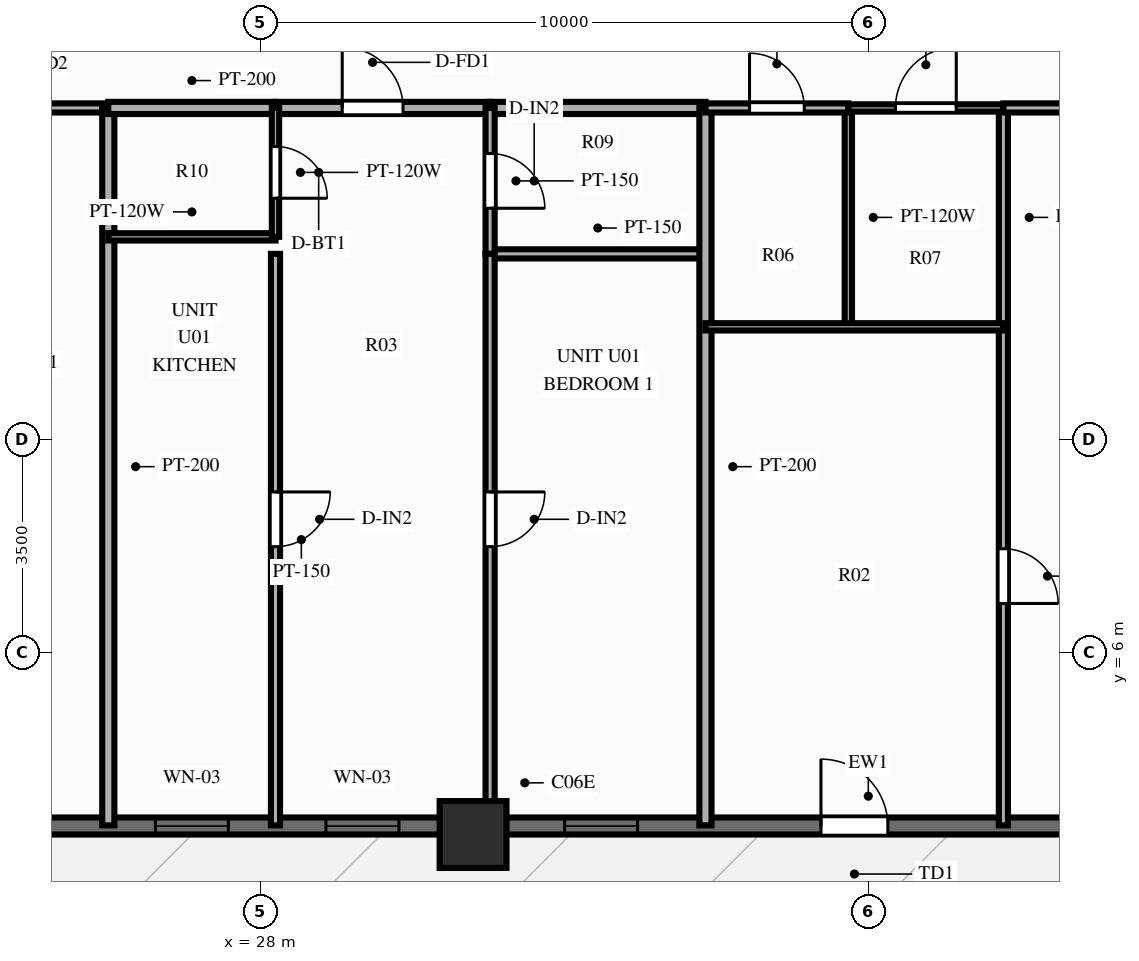
"""IFC4 building model, lengths in metres.
Left out: names, types, materials, properties, quantities, classifications, styles, units other than length and angle.
Written with IfcOpenShell. Run it as: python <this file> out.ifc"""

import sys

from ifc_helpers import new_model, si_unit, direction, frame, frame_2d, origin, origin_2d, place, context, subcontext, project, spatial, rectangle, extrude, source, transform, mapped, element, fill, save


model = new_model("IFC4")
c1 = context("Model", 3, precision=1e-05, world=origin(), true_north=direction((0.0, 1.0)))
c2 = subcontext(c1, "Body", "Model", "MODEL_VIEW")
j1 = project(units=[si_unit("LENGTHUNIT", "METRE"), si_unit("PLANEANGLEUNIT", "RADIAN")], contexts=[c1])
p1 = place(None, origin())
s1 = spatial("IfcSite", under=j1, at=p1, CompositionType="ELEMENT")
p2 = place(p1, origin())
s2 = spatial("IfcBuilding", under=s1, at=p2, CompositionType="ELEMENT")
p3 = place(p2, frame((0.0, 0.0, 46.4)))
s3 = spatial("IfcBuildingStorey", under=s2, at=p3, CompositionType="ELEMENT", Elevation=46.4)
m1 = source(origin(), c2, "Body", "SweptSolid", [
    extrude(rectangle(XDim=1.1, YDim=1.1, at=origin_2d()), origin(), (0.0, 0.0, 1.0), 3.0),
])
p4 = place(p3, frame((31.5, 3.0, 0.0), z_axis=(0.0, 0.0, 1.0), x_axis=(1.0, 0.0, 0.0)))
e1 = element("IfcColumn", 1, at=p4, inside=s3, PredefinedType="COLUMN", context=c2, shape_type="MappedRepresentation", body=[
    mapped(m1, transform((0.0, 0.0, 0.0), scale=1.0)),
])
p5 = place(p3, frame((15.5, 3.14, 0.0), z_axis=(0.0, 0.0, 1.0), x_axis=(1.0, 0.0, 0.0)))
e2 = element("IfcWall", 2, at=p5, inside=s3, PredefinedType="SOLIDWALL", context=c2, shape_type="SweptSolid", body=[
    extrude(rectangle(XDim=45.0, YDim=0.28, at=frame_2d((22.5, 0.0))), origin(), (0.0, 0.0, 1.0), 2.28),
])
p6 = place(p5, frame((2.135, 0.0, 0.25)))
e3 = element("IfcOpeningElement", 3, at=p6, cuts=e2, PredefinedType="OPENING", context=c2, shape_type="SweptSolid", body=[
    extrude(rectangle(XDim=1.2, YDim=1.5, at=frame_2d((0.6, 0.75))), frame((0.0, 0.152, 0.0), z_axis=(0.0, -1.0, 0.0), x_axis=(1.0, 0.0, 0.0)), (0.0, 0.0, 1.0), 0.304),
])
p7 = place(p5, frame((6.94, 0.0, 0.25)))
e4 = element("IfcOpeningElement", 4, at=p7, cuts=e2, PredefinedType="OPENING", context=c2, shape_type="SweptSolid", body=[
    extrude(rectangle(XDim=1.2, YDim=1.5, at=frame_2d((0.6, 0.75))), frame((0.0, 0.152, 0.0), z_axis=(0.0, -1.0, 0.0), x_axis=(1.0, 0.0, 0.0)), (0.0, 0.0, 1.0), 0.304),
])
p8 = place(p5, frame((10.776, 0.0, 0.25)))
e5 = element("IfcOpeningElement", 5, at=p8, cuts=e2, PredefinedType="OPENING", context=c2, shape_type="SweptSolid", body=[
    extrude(rectangle(XDim=1.2, YDim=1.5, at=frame_2d((0.6, 0.75))), frame((0.0, 0.152, 0.0), z_axis=(0.0, -1.0, 0.0), x_axis=(1.0, 0.0, 0.0)), (0.0, 0.0, 1.0), 0.304),
])
p9 = place(p5, frame((13.58, 0.0, 0.25)))
e6 = element("IfcOpeningElement", 6, at=p9, cuts=e2, PredefinedType="OPENING", context=c2, shape_type="SweptSolid", body=[
    extrude(rectangle(XDim=1.2, YDim=1.5, at=frame_2d((0.6, 0.75))), frame((0.0, 0.152, 0.0), z_axis=(0.0, -1.0, 0.0), x_axis=(1.0, 0.0, 0.0)), (0.0, 0.0, 1.0), 0.304),
])
p10 = place(p5, frame((17.506, 0.0, 0.25)))
e7 = element("IfcOpeningElement", 7, at=p10, cuts=e2, PredefinedType="OPENING", context=c2, shape_type="SweptSolid", body=[
    extrude(rectangle(XDim=1.2, YDim=1.5, at=frame_2d((0.6, 0.75))), frame((0.0, 0.152, 0.0), z_axis=(0.0, -1.0, 0.0), x_axis=(1.0, 0.0, 0.0)), (0.0, 0.0, 1.0), 0.304),
])
p11 = place(p5, frame((22.822, 0.0, 0.0), z_axis=(0.0, 0.0, 1.0), x_axis=(-1.0, 0.0, 0.0)))
e8 = element("IfcOpeningElement", 8, at=p11, cuts=e2, PredefinedType="OPENING", context=c2, shape_type="SweptSolid", body=[
    extrude(rectangle(XDim=1.1, YDim=2.15, at=frame_2d((0.55, 1.075))), frame((0.0, 0.152, 0.0), z_axis=(0.0, -1.0, 0.0), x_axis=(1.0, 0.0, 0.0)), (0.0, 0.0, 1.0), 0.304),
])
p12 = place(p5, frame((26.066, 0.0, 0.25)))
e9 = element("IfcOpeningElement", 9, at=p12, cuts=e2, PredefinedType="OPENING", context=c2, shape_type="SweptSolid", body=[
    extrude(rectangle(XDim=1.2, YDim=1.5, at=frame_2d((0.6, 0.75))), frame((0.0, 0.152, 0.0), z_axis=(0.0, -1.0, 0.0), x_axis=(1.0, 0.0, 0.0)), (0.0, 0.0, 1.0), 0.304),
])
p13 = place(p5, frame((30.255, 0.0, 0.25)))
e10 = element("IfcOpeningElement", 10, at=p13, cuts=e2, PredefinedType="OPENING", context=c2, shape_type="SweptSolid", body=[
    extrude(rectangle(XDim=1.2, YDim=1.5, at=frame_2d((0.6, 0.75))), frame((0.0, 0.152, 0.0), z_axis=(0.0, -1.0, 0.0), x_axis=(1.0, 0.0, 0.0)), (0.0, 0.0, 1.0), 0.304),
])
p14 = place(p5, frame((33.346, 0.0, 0.25)))
e11 = element("IfcOpeningElement", 11, at=p14, cuts=e2, PredefinedType="OPENING", context=c2, shape_type="SweptSolid", body=[
    extrude(rectangle(XDim=1.2, YDim=1.5, at=frame_2d((0.6, 0.75))), frame((0.0, 0.152, 0.0), z_axis=(0.0, -1.0, 0.0), x_axis=(1.0, 0.0, 0.0)), (0.0, 0.0, 1.0), 0.304),
])
p15 = place(p5, frame((37.821, 0.0, 0.25)))
e12 = element("IfcOpeningElement", 12, at=p15, cuts=e2, PredefinedType="OPENING", context=c2, shape_type="SweptSolid", body=[
    extrude(rectangle(XDim=1.2, YDim=1.5, at=frame_2d((0.6, 0.75))), frame((0.0, 0.152, 0.0), z_axis=(0.0, -1.0, 0.0), x_axis=(1.0, 0.0, 0.0)), (0.0, 0.0, 1.0), 0.304),
])
p16 = place(p5, frame((42.341, 0.0, 0.25)))
e13 = element("IfcOpeningElement", 13, at=p16, cuts=e2, PredefinedType="OPENING", context=c2, shape_type="SweptSolid", body=[
    extrude(rectangle(XDim=1.2, YDim=1.5, at=frame_2d((0.6, 0.75))), frame((0.0, 0.152, 0.0), z_axis=(0.0, -1.0, 0.0), x_axis=(1.0, 0.0, 0.0)), (0.0, 0.0, 1.0), 0.304),
])
p17 = place(p3, frame((20.58, 14.95, 0.0), z_axis=(0.0, 0.0, 1.0), x_axis=(1.0, 0.0, 0.0)))
e14 = element("IfcWall", 14, at=p17, inside=s3, PredefinedType="PARTITIONING", context=c2, shape_type="SweptSolid", body=[
    extrude(rectangle(XDim=4.921, YDim=0.15, at=frame_2d((2.46, 0.0))), origin(), (0.0, 0.0, 1.0), 2.79),
])
p18 = place(p17, frame((1.773, 0.0, 0.0)))
e15 = element("IfcOpeningElement", 15, at=p18, cuts=e14, PredefinedType="OPENING", context=c2, shape_type="SweptSolid", body=[
    extrude(rectangle(XDim=1.1, YDim=2.15, at=frame_2d((0.55, 1.075))), frame((0.0, 0.087, 0.0), z_axis=(0.0, -1.0, 0.0), x_axis=(1.0, 0.0, 0.0)), (0.0, 0.0, 1.0), 0.174),
])
p19 = place(p3, frame((25.501, 14.95, 0.0), z_axis=(0.0, 0.0, 1.0), x_axis=(0.0, -1.0, 0.0)))
e16 = element("IfcWall", 16, at=p19, inside=s3, PredefinedType="PARTITIONING", context=c2, shape_type="SweptSolid", body=[
    extrude(rectangle(XDim=11.8, YDim=0.2, at=frame_2d((5.9, 0.0))), origin(), (0.0, 0.0, 1.0), 2.79),
])
p20 = place(p3, frame((25.501, 14.95, 0.0), z_axis=(0.0, 0.0, 1.0), x_axis=(1.0, 0.0, 0.0)))
e17 = element("IfcWall", 17, at=p20, inside=s3, PredefinedType="PARTITIONING", context=c2, shape_type="SweptSolid", body=[
    extrude(rectangle(XDim=2.75, YDim=0.2, at=frame_2d((1.375, 0.0))), origin(), (0.0, 0.0, 1.0), 2.79),
])
p21 = place(p3, frame((28.25, 14.95, 0.0), z_axis=(0.0, 0.0, 1.0), x_axis=(1.0, 0.0, 0.0)))
e18 = element("IfcWall", 18, at=p21, inside=s3, PredefinedType="PARTITIONING", context=c2, shape_type="SweptSolid", body=[
    extrude(rectangle(XDim=3.53, YDim=0.2, at=frame_2d((1.765, 0.0))), origin(), (0.0, 0.0, 1.0), 2.79),
])
p22 = place(p21, frame((1.097, 0.0, 0.0)))
e19 = element("IfcOpeningElement", 19, at=p22, cuts=e18, PredefinedType="OPENING", context=c2, shape_type="SweptSolid", body=[
    extrude(rectangle(XDim=1.0, YDim=2.15, at=frame_2d((0.5, 1.075))), frame((0.0, 0.112, 0.0), z_axis=(0.0, -1.0, 0.0), x_axis=(1.0, 0.0, 0.0)), (0.0, 0.0, 1.0), 0.224),
])
p23 = place(p3, frame((31.78, 14.95, 0.0), z_axis=(0.0, 0.0, 1.0), x_axis=(1.0, 0.0, 0.0)))
e20 = element("IfcWall", 20, at=p23, inside=s3, PredefinedType="PARTITIONING", context=c2, shape_type="SweptSolid", body=[
    extrude(rectangle(XDim=3.542, YDim=0.2, at=frame_2d((1.771, 0.0))), origin(), (0.0, 0.0, 1.0), 2.79),
])
p24 = place(p3, frame((25.501, 12.83, 0.0), z_axis=(0.0, 0.0, 1.0), x_axis=(1.0, 0.0, 0.0)))
e21 = element("IfcWall", 21, at=p24, inside=s3, PredefinedType="PARTITIONING", context=c2, shape_type="SweptSolid", body=[
    extrude(rectangle(XDim=2.75, YDim=0.12, at=frame_2d((1.375, 0.0))), origin(), (0.0, 0.0, 1.0), 2.79),
])
p25 = place(p3, frame((31.78, 12.55, 0.0), z_axis=(0.0, 0.0, 1.0), x_axis=(1.0, 0.0, 0.0)))
e22 = element("IfcWall", 22, at=p25, inside=s3, PredefinedType="PARTITIONING", context=c2, shape_type="SweptSolid", body=[
    extrude(rectangle(XDim=3.542, YDim=0.15, at=frame_2d((1.771, 0.0))), origin(), (0.0, 0.0, 1.0), 2.79),
])
p26 = place(p3, frame((28.25, 14.95, 0.0), z_axis=(0.0, 0.0, 1.0), x_axis=(0.0, -1.0, 0.0)))
e23 = element("IfcWall", 23, at=p26, inside=s3, PredefinedType="PARTITIONING", context=c2, shape_type="SweptSolid", body=[
    extrude(rectangle(XDim=2.12, YDim=0.12, at=frame_2d((1.06, 0.0))), origin(), (0.0, 0.0, 1.0), 2.79),
])
p27 = place(p26, frame((0.635, 0.0, 0.0)))
e24 = element("IfcOpeningElement", 24, at=p27, cuts=e23, PredefinedType="OPENING", context=c2, shape_type="SweptSolid", body=[
    extrude(rectangle(XDim=0.85, YDim=2.05, at=frame_2d((0.425, 1.025))), frame((0.0, 0.072, 0.0), z_axis=(0.0, -1.0, 0.0), x_axis=(1.0, 0.0, 0.0)), (0.0, 0.0, 1.0), 0.144),
])
p28 = place(p3, frame((28.25, 12.55, 0.0), z_axis=(0.0, 0.0, 1.0), x_axis=(0.0, -1.0, 0.0)))
e25 = element("IfcWall", 25, at=p28, inside=s3, PredefinedType="PARTITIONING", context=c2, shape_type="SweptSolid", body=[
    extrude(rectangle(XDim=9.4, YDim=0.15, at=frame_2d((4.7, 0.0))), origin(), (0.0, 0.0, 1.0), 2.79),
])
p29 = place(p28, frame((3.916, 0.0, 0.0)))
e26 = element("IfcOpeningElement", 26, at=p29, cuts=e25, PredefinedType="OPENING", context=c2, shape_type="SweptSolid", body=[
    extrude(rectangle(XDim=0.9, YDim=2.1, at=frame_2d((0.45, 1.05))), frame((0.0, 0.087, 0.0), z_axis=(0.0, -1.0, 0.0), x_axis=(1.0, 0.0, 0.0)), (0.0, 0.0, 1.0), 0.174),
])
p30 = place(p3, frame((31.78, 14.95, 0.0), z_axis=(0.0, 0.0, 1.0), x_axis=(0.0, -1.0, 0.0)))
e27 = element("IfcWall", 27, at=p30, inside=s3, PredefinedType="PARTITIONING", context=c2, shape_type="SweptSolid", body=[
    extrude(rectangle(XDim=2.4, YDim=0.15, at=frame_2d((1.2, 0.0))), origin(), (0.0, 0.0, 1.0), 2.79),
])
p31 = place(p30, frame((0.75, 0.0, 0.0)))
e28 = element("IfcOpeningElement", 28, at=p31, cuts=e27, PredefinedType="OPENING", context=c2, shape_type="SweptSolid", body=[
    extrude(rectangle(XDim=0.9, YDim=2.1, at=frame_2d((0.45, 1.05))), frame((0.0, 0.087, 0.0), z_axis=(0.0, -1.0, 0.0), x_axis=(1.0, 0.0, 0.0)), (0.0, 0.0, 1.0), 0.174),
])
p32 = place(p3, frame((31.78, 12.55, 0.0), z_axis=(0.0, 0.0, 1.0), x_axis=(0.0, -1.0, 0.0)))
e29 = element("IfcWall", 29, at=p32, inside=s3, PredefinedType="PARTITIONING", context=c2, shape_type="SweptSolid", body=[
    extrude(rectangle(XDim=9.4, YDim=0.15, at=frame_2d((4.7, 0.0))), origin(), (0.0, 0.0, 1.0), 2.79),
])
p33 = place(p32, frame((3.916, 0.0, 0.0)))
e30 = element("IfcOpeningElement", 30, at=p33, cuts=e29, PredefinedType="OPENING", context=c2, shape_type="SweptSolid", body=[
    extrude(rectangle(XDim=0.9, YDim=2.1, at=frame_2d((0.45, 1.05))), frame((0.0, 0.087, 0.0), z_axis=(0.0, -1.0, 0.0), x_axis=(1.0, 0.0, 0.0)), (0.0, 0.0, 1.0), 0.174),
])
p34 = place(p3, frame((35.322, 14.95, 0.0), z_axis=(0.0, 0.0, 1.0), x_axis=(0.0, -1.0, 0.0)))
e31 = element("IfcWall", 31, at=p34, inside=s3, PredefinedType="PARTITIONING", context=c2, shape_type="SweptSolid", body=[
    extrude(rectangle(XDim=11.8, YDim=0.2, at=frame_2d((5.9, 0.0))), origin(), (0.0, 0.0, 1.0), 2.79),
])
p35 = place(p3, frame((37.672, 14.95, 0.0), z_axis=(0.0, 0.0, 1.0), x_axis=(0.0, -1.0, 0.0)))
e32 = element("IfcWall", 32, at=p35, inside=s3, PredefinedType="PARTITIONING", context=c2, shape_type="SweptSolid", body=[
    extrude(rectangle(XDim=3.6, YDim=0.12, at=frame_2d((1.8, 0.0))), origin(), (0.0, 0.0, 1.0), 2.79),
])
p36 = place(p3, frame((40.222, 14.95, 0.0), z_axis=(0.0, 0.0, 1.0), x_axis=(0.0, -1.0, 0.0)))
e33 = element("IfcWall", 33, at=p36, inside=s3, PredefinedType="PARTITIONING", context=c2, shape_type="SweptSolid", body=[
    extrude(rectangle(XDim=3.6, YDim=0.15, at=frame_2d((1.8, 0.0))), origin(), (0.0, 0.0, 1.0), 2.79),
])
p37 = place(p3, frame((40.222, 11.35, 0.0), z_axis=(0.0, 0.0, 1.0), x_axis=(0.0, -1.0, 0.0)))
e34 = element("IfcWall", 34, at=p37, inside=s3, PredefinedType="PARTITIONING", context=c2, shape_type="SweptSolid", body=[
    extrude(rectangle(XDim=8.2, YDim=0.15, at=frame_2d((4.1, 0.0))), origin(), (0.0, 0.0, 1.0), 2.79),
])
p38 = place(p37, frame((3.65, 0.0, 0.0)))
e35 = element("IfcOpeningElement", 35, at=p38, cuts=e34, PredefinedType="OPENING", context=c2, shape_type="SweptSolid", body=[
    extrude(rectangle(XDim=0.9, YDim=2.1, at=frame_2d((0.45, 1.05))), frame((0.0, 0.087, 0.0), z_axis=(0.0, -1.0, 0.0), x_axis=(1.0, 0.0, 0.0)), (0.0, 0.0, 1.0), 0.174),
])
p39 = place(p3, frame((35.322, 11.35, 0.0), z_axis=(0.0, 0.0, 1.0), x_axis=(1.0, 0.0, 0.0)))
e36 = element("IfcWall", 36, at=p39, inside=s3, PredefinedType="PARTITIONING", context=c2, shape_type="SweptSolid", body=[
    extrude(rectangle(XDim=4.9, YDim=0.12, at=frame_2d((2.45, 0.0))), origin(), (0.0, 0.0, 1.0), 2.79),
])
p40 = place(p3, frame((35.322, 14.95, 0.0), z_axis=(0.0, 0.0, 1.0), x_axis=(1.0, 0.0, 0.0)))
e37 = element("IfcWall", 37, at=p40, inside=s3, PredefinedType="PARTITIONING", context=c2, shape_type="SweptSolid", body=[
    extrude(rectangle(XDim=2.35, YDim=0.15, at=frame_2d((1.175, 0.0))), origin(), (0.0, 0.0, 1.0), 2.79),
])
p41 = place(p40, frame((0.725, 0.0, 0.0)))
e38 = element("IfcOpeningElement", 38, at=p41, cuts=e37, PredefinedType="OPENING", context=c2, shape_type="SweptSolid", body=[
    extrude(rectangle(XDim=0.9, YDim=2.1, at=frame_2d((0.45, 1.05))), frame((0.0, 0.087, 0.0), z_axis=(0.0, -1.0, 0.0), x_axis=(1.0, 0.0, 0.0)), (0.0, 0.0, 1.0), 0.174),
])
p42 = place(p3, frame((37.672, 14.95, 0.0), z_axis=(0.0, 0.0, 1.0), x_axis=(1.0, 0.0, 0.0)))
e39 = element("IfcWall", 39, at=p42, inside=s3, PredefinedType="PARTITIONING", context=c2, shape_type="SweptSolid", body=[
    extrude(rectangle(XDim=2.55, YDim=0.12, at=frame_2d((1.275, 0.0))), origin(), (0.0, 0.0, 1.0), 2.79),
])
p43 = place(p42, frame((0.775, 0.0, 0.0)))
e40 = element("IfcOpeningElement", 40, at=p43, cuts=e39, PredefinedType="OPENING", context=c2, shape_type="SweptSolid", body=[
    extrude(rectangle(XDim=1.0, YDim=2.1, at=frame_2d((0.5, 1.05))), frame((0.0, 0.072, 0.0), z_axis=(0.0, -1.0, 0.0), x_axis=(1.0, 0.0, 0.0)), (0.0, 0.0, 1.0), 0.144),
])
p44 = place(p3, frame((40.222, 14.95, 0.0), z_axis=(0.0, 0.0, 1.0), x_axis=(1.0, 0.0, 0.0)))
e41 = element("IfcWall", 41, at=p44, inside=s3, PredefinedType="PARTITIONING", context=c2, shape_type="SweptSolid", body=[
    extrude(rectangle(XDim=7.599, YDim=0.15, at=frame_2d((3.8, 0.0))), origin(), (0.0, 0.0, 1.0), 2.79),
])
p45 = place(p44, frame((3.0, 0.0, 0.0)))
e42 = element("IfcOpeningElement", 42, at=p45, cuts=e41, PredefinedType="OPENING", context=c2, shape_type="SweptSolid", body=[
    extrude(rectangle(XDim=1.1, YDim=2.15, at=frame_2d((0.55, 1.075))), frame((0.0, 0.087, 0.0), z_axis=(0.0, -1.0, 0.0), x_axis=(1.0, 0.0, 0.0)), (0.0, 0.0, 1.0), 0.174),
])
m2 = source(origin(), c2, "Body", "SweptSolid", [
    extrude(rectangle(XDim=1.2, YDim=1.5, at=frame_2d((0.6, 0.75))), frame((0.0, 0.03, 0.0), z_axis=(0.0, -1.0, 0.0), x_axis=(1.0, 0.0, 0.0)), (0.0, 0.0, 1.0), 0.06),
])
p46 = place(p8, origin())
e43 = element("IfcWindow", 43, at=p46, inside=s3, PartitioningType="SINGLE_PANEL", PredefinedType="WINDOW", context=c2, shape_type="MappedRepresentation", body=[
    mapped(m2, transform((0.0, 0.0, 0.0), scale=1.0)),
])
fill(e5, e43)
p47 = place(p9, origin())
e44 = element("IfcWindow", 44, at=p47, inside=s3, PartitioningType="SINGLE_PANEL", PredefinedType="WINDOW", context=c2, shape_type="MappedRepresentation", body=[
    mapped(m2, transform((0.0, 0.0, 0.0), scale=1.0)),
])
fill(e6, e44)
p48 = place(p10, origin())
e45 = element("IfcWindow", 45, at=p48, inside=s3, PartitioningType="SINGLE_PANEL", PredefinedType="WINDOW", context=c2, shape_type="MappedRepresentation", body=[
    mapped(m2, transform((0.0, 0.0, 0.0), scale=1.0)),
])
fill(e7, e45)
m3 = source(origin(), c2, "Body", "SweptSolid", [
    extrude(rectangle(XDim=1.1, YDim=2.15, at=frame_2d((0.55, 1.075))), frame((0.0, 0.025, 0.0), z_axis=(0.0, -1.0, 0.0), x_axis=(1.0, 0.0, 0.0)), (0.0, 0.0, 1.0), 0.05),
])
p49 = place(p11, origin())
e46 = element("IfcDoor", 46, at=p49, inside=s3, OperationType="SINGLE_SWING_RIGHT", PredefinedType="DOOR", context=c2, shape_type="MappedRepresentation", body=[
    mapped(m3, transform((0.0, 0.0, 0.0), scale=1.0)),
])
fill(e8, e46)
m4 = source(origin(), c2, "Body", "SweptSolid", [
    extrude(rectangle(XDim=1.0, YDim=2.15, at=frame_2d((0.5, 1.075))), frame((0.0, 0.025, 0.0), z_axis=(0.0, -1.0, 0.0), x_axis=(1.0, 0.0, 0.0)), (0.0, 0.0, 1.0), 0.05),
])
p50 = place(p22, origin())
e47 = element("IfcDoor", 47, at=p50, inside=s3, OperationType="SINGLE_SWING_LEFT", PredefinedType="DOOR", context=c2, shape_type="MappedRepresentation", body=[
    mapped(m4, transform((0.0, 0.0, 0.0), scale=1.0)),
])
fill(e19, e47)
m5 = source(origin(), c2, "Body", "SweptSolid", [
    extrude(rectangle(XDim=0.85, YDim=2.05, at=frame_2d((0.425, 1.025))), frame((0.0, 0.025, 0.0), z_axis=(0.0, -1.0, 0.0), x_axis=(1.0, 0.0, 0.0)), (0.0, 0.0, 1.0), 0.05),
])
p51 = place(p27, origin())
e48 = element("IfcDoor", 48, at=p51, inside=s3, OperationType="SINGLE_SWING_RIGHT", PredefinedType="DOOR", context=c2, shape_type="MappedRepresentation", body=[
    mapped(m5, transform((0.0, 0.0, 0.0), scale=1.0)),
])
fill(e24, e48)
m6 = source(origin(), c2, "Body", "SweptSolid", [
    extrude(rectangle(XDim=0.9, YDim=2.1, at=frame_2d((0.45, 1.05))), frame((0.0, 0.025, 0.0), z_axis=(0.0, -1.0, 0.0), x_axis=(1.0, 0.0, 0.0)), (0.0, 0.0, 1.0), 0.05),
])
p52 = place(p29, origin())
e49 = element("IfcDoor", 49, at=p52, inside=s3, OperationType="SINGLE_SWING_LEFT", PredefinedType="DOOR", context=c2, shape_type="MappedRepresentation", body=[
    mapped(m6, transform((0.0, 0.0, 0.0), scale=1.0)),
])
fill(e26, e49)
p53 = place(p31, origin())
e50 = element("IfcDoor", 50, at=p53, inside=s3, OperationType="SINGLE_SWING_RIGHT", PredefinedType="DOOR", context=c2, shape_type="MappedRepresentation", body=[
    mapped(m6, transform((0.0, 0.0, 0.0), scale=1.0)),
])
fill(e28, e50)
p54 = place(p33, origin())
e51 = element("IfcDoor", 51, at=p54, inside=s3, OperationType="SINGLE_SWING_LEFT", PredefinedType="DOOR", context=c2, shape_type="MappedRepresentation", body=[
    mapped(m6, transform((0.0, 0.0, 0.0), scale=1.0)),
])
fill(e30, e51)
p55 = place(p38, origin())
e52 = element("IfcDoor", 52, at=p55, inside=s3, OperationType="SINGLE_SWING_RIGHT", PredefinedType="DOOR", context=c2, shape_type="MappedRepresentation", body=[
    mapped(m6, transform((0.0, 0.0, 0.0), scale=1.0)),
])
fill(e35, e52)
p56 = place(p41, origin())
e53 = element("IfcDoor", 53, at=p56, inside=s3, OperationType="SINGLE_SWING_LEFT", PredefinedType="DOOR", context=c2, shape_type="MappedRepresentation", body=[
    mapped(m6, transform((0.0, 0.0, 0.0), scale=1.0)),
])
fill(e38, e53)
m7 = source(origin(), c2, "Body", "SweptSolid", [
    extrude(rectangle(XDim=1.0, YDim=2.1, at=frame_2d((0.5, 1.05))), frame((0.0, 0.025, 0.0), z_axis=(0.0, -1.0, 0.0), x_axis=(1.0, 0.0, 0.0)), (0.0, 0.0, 1.0), 0.05),
])
p57 = place(p43, origin())
e54 = element("IfcDoor", 54, at=p57, inside=s3, OperationType="SINGLE_SWING_RIGHT", PredefinedType="DOOR", context=c2, shape_type="MappedRepresentation", body=[
    mapped(m7, transform((0.0, 0.0, 0.0), scale=1.0)),
])
fill(e40, e54)
save(model, sys.argv[1])
